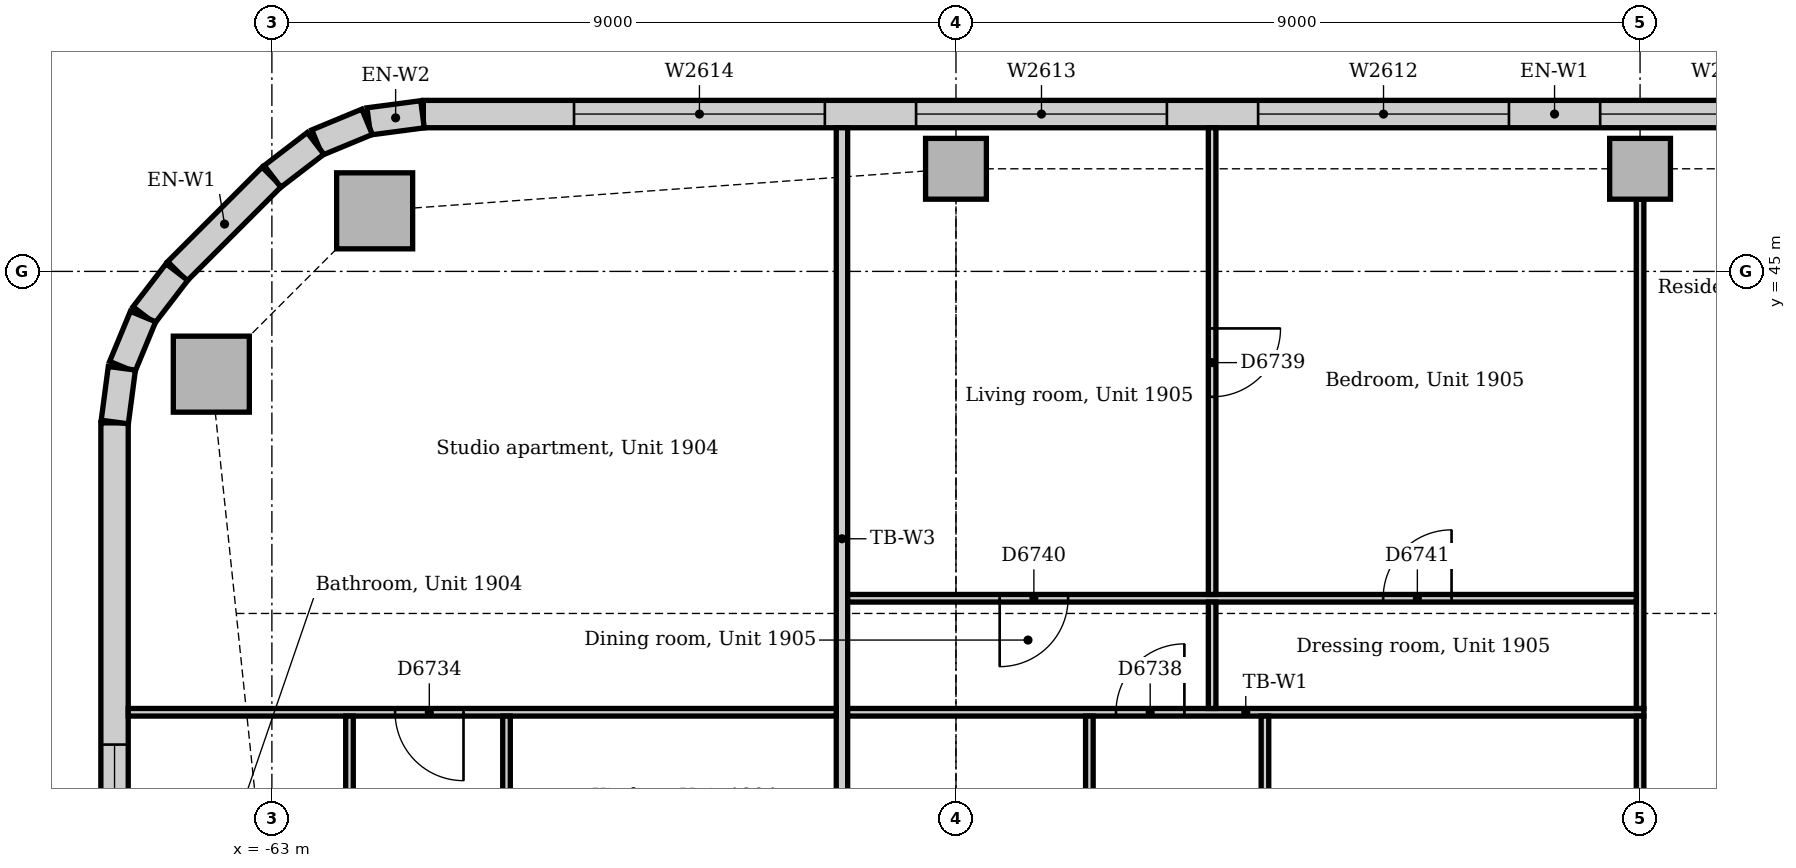
"""IFC4 building model, lengths in metres.
Left out: names, types, materials, properties, quantities, classifications, styles, units other than length and angle.
Written with IfcOpenShell. Run it as: python <this file> out.ifc"""

import sys

from ifc_helpers import new_model, si_unit, direction, frame, frame_2d, origin, origin_2d, place, context, subcontext, project, spatial, rectangle, extrude, element, fill, save


model = new_model("IFC4")
c1 = context("Model", 3, precision=1e-05, world=origin(), true_north=direction((0.0, 1.0)))
c2 = subcontext(c1, "Body", "Model", "MODEL_VIEW")
j1 = project(units=[si_unit("LENGTHUNIT", "METRE"), si_unit("PLANEANGLEUNIT", "RADIAN")], contexts=[c1])
p1 = place(None, origin())
s1 = spatial("IfcSite", under=j1, at=p1, CompositionType="ELEMENT")
p2 = place(p1, origin())
s2 = spatial("IfcBuilding", under=s1, at=p2, CompositionType="ELEMENT")
p3 = place(p2, frame((0.0, 0.0, 83.0)))
s3 = spatial("IfcBuildingStorey", under=s2, at=p3, CompositionType="ELEMENT", Elevation=83.0)
for number, where, z_axis, x_axis in (
    (1, (-61.648, 45.797, 0.0), (0.0, 0.0, 1.0), (1.0, 0.0, 0.0)),
    (2, (-63.797, 43.648, 0.0), (0.0, 0.0, 1.0), (1.0, 0.0, 0.0)),
):
    element("IfcColumn", number, at=place(p3, frame(where, z_axis=z_axis, x_axis=x_axis)), inside=s3, PredefinedType="COLUMN", context=c2, shape_type="SweptSolid", body=[
        extrude(rectangle(XDim=1.0, YDim=1.0, at=origin_2d()), origin(), (0.0, 0.0, 1.0), 3.85),
    ])
for number, where, z_axis, x_axis in (
    (3, (-54.0, 46.35, 0.0), (0.0, 0.0, 1.0), (1.0, 0.0, 0.0)),
    (4, (-45.0, 46.35, 0.0), (0.0, 0.0, 1.0), (1.0, 0.0, 0.0)),
):
    element("IfcColumn", number, at=place(p3, frame(where, z_axis=z_axis, x_axis=x_axis)), inside=s3, PredefinedType="COLUMN", context=c2, shape_type="SweptSolid", body=[
        extrude(rectangle(XDim=0.8, YDim=0.8, at=origin_2d()), origin(), (0.0, 0.0, 1.0), 3.85),
    ])
p4 = place(p3, frame((-31.243, 47.07, 0.0), z_axis=(0.0, 0.0, 1.0), x_axis=(-1.0, 0.0, 0.0)))
e5 = element("IfcWall", 5, at=p4, inside=s3, PredefinedType="STANDARD", context=c2, shape_type="SweptSolid", body=[
    extrude(rectangle(XDim=29.765, YDim=0.36, at=frame_2d((14.882, 0.0))), origin(), (0.0, 0.0, 1.0), 3.85),
])
p5 = place(p4, frame((1.982, 0.0, 0.9)))
e6 = element("IfcOpeningElement", 6, at=p5, cuts=e5, PredefinedType="OPENING", context=c2, shape_type="SweptSolid", body=[
    extrude(rectangle(XDim=3.3, YDim=1.6, at=frame_2d((1.65, 0.8))), frame((0.0, 0.19, 0.0), z_axis=(0.0, -1.0, 0.0), x_axis=(1.0, 0.0, 0.0)), (0.0, 0.0, 1.0), 0.38),
])
p6 = place(p4, frame((6.482, 0.0, 0.9)))
e7 = element("IfcOpeningElement", 7, at=p6, cuts=e5, PredefinedType="OPENING", context=c2, shape_type="SweptSolid", body=[
    extrude(rectangle(XDim=3.3, YDim=1.6, at=frame_2d((1.65, 0.8))), frame((0.0, 0.19, 0.0), z_axis=(0.0, -1.0, 0.0), x_axis=(1.0, 0.0, 0.0)), (0.0, 0.0, 1.0), 0.38),
])
p7 = place(p4, frame((10.982, 0.0, 0.9)))
e8 = element("IfcOpeningElement", 8, at=p7, cuts=e5, PredefinedType="OPENING", context=c2, shape_type="SweptSolid", body=[
    extrude(rectangle(XDim=3.3, YDim=1.6, at=frame_2d((1.65, 0.8))), frame((0.0, 0.19, 0.0), z_axis=(0.0, -1.0, 0.0), x_axis=(1.0, 0.0, 0.0)), (0.0, 0.0, 1.0), 0.38),
])
p8 = place(p4, frame((15.482, 0.0, 0.9)))
e9 = element("IfcOpeningElement", 9, at=p8, cuts=e5, PredefinedType="OPENING", context=c2, shape_type="SweptSolid", body=[
    extrude(rectangle(XDim=3.3, YDim=1.6, at=frame_2d((1.65, 0.8))), frame((0.0, 0.19, 0.0), z_axis=(0.0, -1.0, 0.0), x_axis=(1.0, 0.0, 0.0)), (0.0, 0.0, 1.0), 0.38),
])
p9 = place(p4, frame((19.982, 0.0, 0.9)))
e10 = element("IfcOpeningElement", 10, at=p9, cuts=e5, PredefinedType="OPENING", context=c2, shape_type="SweptSolid", body=[
    extrude(rectangle(XDim=3.3, YDim=1.6, at=frame_2d((1.65, 0.8))), frame((0.0, 0.19, 0.0), z_axis=(0.0, -1.0, 0.0), x_axis=(1.0, 0.0, 0.0)), (0.0, 0.0, 1.0), 0.38),
])
p10 = place(p4, frame((24.482, 0.0, 0.9)))
e11 = element("IfcOpeningElement", 11, at=p10, cuts=e5, PredefinedType="OPENING", context=c2, shape_type="SweptSolid", body=[
    extrude(rectangle(XDim=3.3, YDim=1.6, at=frame_2d((1.65, 0.8))), frame((0.0, 0.19, 0.0), z_axis=(0.0, -1.0, 0.0), x_axis=(1.0, 0.0, 0.0)), (0.0, 0.0, 1.0), 0.38),
])
p11 = place(p3, frame((-63.001, 46.244, 0.0), z_axis=(0.0, 0.0, 1.0), x_axis=(-0.707106781187, -0.707106781187, 0.0)))
e12 = element("IfcWall", 12, at=p11, inside=s3, PredefinedType="STANDARD", context=c2, shape_type="SweptSolid", body=[
    extrude(rectangle(XDim=1.757, YDim=0.36, at=frame_2d((0.879, 0.0))), origin(), (0.0, 0.0, 1.0), 3.85),
])
p12 = place(p3, frame((-65.07, 43.007, 0.0), z_axis=(0.0, 0.0, 1.0), x_axis=(0.0, -1.0, 0.0)))
e13 = element("IfcWall", 13, at=p12, inside=s3, PredefinedType="STANDARD", context=c2, shape_type="SweptSolid", body=[
    extrude(rectangle(XDim=23.765, YDim=0.36, at=frame_2d((11.882, 0.0))), origin(), (0.0, 0.0, 1.0), 3.85),
])
p13 = place(p12, frame((4.232, 0.0, 0.9)))
e14 = element("IfcOpeningElement", 14, at=p13, cuts=e13, PredefinedType="OPENING", context=c2, shape_type="SweptSolid", body=[
    extrude(rectangle(XDim=1.8, YDim=1.6, at=frame_2d((0.9, 0.8))), frame((0.0, 0.19, 0.0), z_axis=(0.0, -1.0, 0.0), x_axis=(1.0, 0.0, 0.0)), (0.0, 0.0, 1.0), 0.38),
])
p14 = place(p12, frame((9.332, 0.0, 0.9)))
e15 = element("IfcOpeningElement", 15, at=p14, cuts=e13, PredefinedType="OPENING", context=c2, shape_type="SweptSolid", body=[
    extrude(rectangle(XDim=1.8, YDim=1.6, at=frame_2d((0.9, 0.8))), frame((0.0, 0.19, 0.0), z_axis=(0.0, -1.0, 0.0), x_axis=(1.0, 0.0, 0.0)), (0.0, 0.0, 1.0), 0.38),
])
p15 = place(p12, frame((12.482, 0.0, 0.9)))
e16 = element("IfcOpeningElement", 16, at=p15, cuts=e13, PredefinedType="OPENING", context=c2, shape_type="SweptSolid", body=[
    extrude(rectangle(XDim=3.3, YDim=1.6, at=frame_2d((1.65, 0.8))), frame((0.0, 0.19, 0.0), z_axis=(0.0, -1.0, 0.0), x_axis=(1.0, 0.0, 0.0)), (0.0, 0.0, 1.0), 0.38),
])
p16 = place(p12, frame((16.982, 0.0, 0.9)))
e17 = element("IfcOpeningElement", 17, at=p16, cuts=e13, PredefinedType="OPENING", context=c2, shape_type="SweptSolid", body=[
    extrude(rectangle(XDim=3.3, YDim=1.6, at=frame_2d((1.65, 0.8))), frame((0.0, 0.19, 0.0), z_axis=(0.0, -1.0, 0.0), x_axis=(1.0, 0.0, 0.0)), (0.0, 0.0, 1.0), 0.38),
])
for number, where, z_axis, x_axis in (
    (18, (-61.019, 47.067, 0.0), (0.0, 0.0, 1.0), (-0.991, -0.131, 0.0)),
    (19, (-61.747, 46.968, 0.0), (0.0, 0.0, 1.0), (-0.924, -0.383, 0.0)),
):
    element("IfcWall", number, at=place(p3, frame(where, z_axis=z_axis, x_axis=x_axis)), inside=s3, PredefinedType="STANDARD", context=c2, shape_type="SweptSolid", body=[
        extrude(rectangle(XDim=0.713, YDim=0.36, at=frame_2d((0.356, 0.0))), origin(), (0.0, 0.0, 1.0), 3.85),
    ])
for number, where, z_axis, x_axis in (
    (20, (-62.425, 46.684, 0.0), (0.0, 0.0, 1.0), (-0.793, -0.609, 0.0)),
    (21, (-64.25, 44.991, 0.0), (0.0, 0.0, 1.0), (-0.609, -0.793, 0.0)),
):
    element("IfcWall", number, at=place(p3, frame(where, z_axis=z_axis, x_axis=x_axis)), inside=s3, PredefinedType="STANDARD", context=c2, shape_type="SweptSolid", body=[
        extrude(rectangle(XDim=0.713, YDim=0.36, at=frame_2d((0.357, 0.0))), origin(), (0.0, 0.0, 1.0), 3.85),
    ])
for number, where, z_axis, x_axis in (
    (22, (-64.695, 44.406, 0.0), (0.0, 0.0, 1.0), (-0.383, -0.924, 0.0)),
    (23, (-64.974, 43.726, 0.0), (0.0, 0.0, 1.0), (-0.131, -0.991, 0.0)),
):
    element("IfcWall", number, at=place(p3, frame(where, z_axis=z_axis, x_axis=x_axis)), inside=s3, PredefinedType="STANDARD", context=c2, shape_type="SweptSolid", body=[
        extrude(rectangle(XDim=0.713, YDim=0.36, at=frame_2d((0.356, 0.0))), origin(), (0.0, 0.0, 1.0), 3.85),
    ])
p17 = place(p3, frame((-55.5, 36.075, 0.0), z_axis=(0.0, 0.0, 1.0), x_axis=(0.0, 1.0, 0.0)))
e24 = element("IfcWall", 24, at=p17, inside=s3, PredefinedType="PARTITIONING", context=c2, shape_type="SweptSolid", body=[
    extrude(rectangle(XDim=10.815, YDim=0.15, at=frame_2d((5.407, 0.0))), origin(), (0.0, 0.0, 1.0), 3.85),
])
p18 = place(p3, frame((-55.425, 39.2, 0.0), z_axis=(0.0, 0.0, 1.0), x_axis=(1.0, 0.0, 0.0)))
e25 = element("IfcWall", 25, at=p18, inside=s3, PredefinedType="PARTITIONING", context=c2, shape_type="SweptSolid", body=[
    extrude(rectangle(XDim=10.475, YDim=0.1, at=frame_2d((5.237, 0.0))), origin(), (0.0, 0.0, 1.0), 3.85),
])
p19 = place(p18, frame((3.53, 0.0, 0.0)))
e26 = element("IfcOpeningElement", 26, at=p19, cuts=e25, PredefinedType="OPENING", context=c2, shape_type="SweptSolid", body=[
    extrude(rectangle(XDim=0.9, YDim=2.1, at=frame_2d((0.45, 1.05))), frame((0.0, 0.06, 0.0), z_axis=(0.0, -1.0, 0.0), x_axis=(1.0, 0.0, 0.0)), (0.0, 0.0, 1.0), 0.12),
])
p20 = place(p3, frame((-64.89, 39.2, 0.0), z_axis=(0.0, 0.0, 1.0), x_axis=(1.0, 0.0, 0.0)))
e27 = element("IfcWall", 27, at=p20, inside=s3, PredefinedType="PARTITIONING", context=c2, shape_type="SweptSolid", body=[
    extrude(rectangle(XDim=9.315, YDim=0.1, at=frame_2d((4.657, 0.0))), origin(), (0.0, 0.0, 1.0), 3.85),
])
p21 = place(p20, frame((3.511, 0.0, 0.0)))
e28 = element("IfcOpeningElement", 28, at=p21, cuts=e27, PredefinedType="OPENING", context=c2, shape_type="SweptSolid", body=[
    extrude(rectangle(XDim=0.9, YDim=2.1, at=frame_2d((0.45, 1.05))), frame((0.0, 0.06, 0.0), z_axis=(0.0, -1.0, 0.0), x_axis=(1.0, 0.0, 0.0)), (0.0, 0.0, 1.0), 0.12),
])
p22 = place(p3, frame((-45.0, 39.25, 0.0), z_axis=(0.0, 0.0, 1.0), x_axis=(0.0, 1.0, 0.0)))
e29 = element("IfcWall", 29, at=p22, inside=s3, PredefinedType="PARTITIONING", context=c2, shape_type="SweptSolid", body=[
    extrude(rectangle(XDim=6.7, YDim=0.1, at=frame_2d((3.35, 0.0))), origin(), (0.0, 0.0, 1.0), 3.256),
])
p23 = place(p3, frame((-45.0, 36.35, 0.0), z_axis=(0.0, 0.0, 1.0), x_axis=(0.0, 1.0, 0.0)))
e30 = element("IfcWall", 30, at=p23, inside=s3, PredefinedType="PARTITIONING", context=c2, shape_type="SweptSolid", body=[
    extrude(rectangle(XDim=2.8, YDim=0.1, at=frame_2d((1.4, 0.0))), origin(), (0.0, 0.0, 1.0), 3.256),
])
p24 = place(p3, frame((-55.425, 40.7, 0.0), z_axis=(0.0, 0.0, 1.0), x_axis=(1.0, 0.0, 0.0)))
e31 = element("IfcWall", 31, at=p24, inside=s3, PredefinedType="PARTITIONING", context=c2, shape_type="SweptSolid", body=[
    extrude(rectangle(XDim=10.375, YDim=0.1, at=frame_2d((5.188, 0.0))), origin(), (0.0, 0.0, 1.0), 3.85),
])
p25 = place(p24, frame((2.0, 0.0, 0.0)))
e32 = element("IfcOpeningElement", 32, at=p25, cuts=e31, PredefinedType="OPENING", context=c2, shape_type="SweptSolid", body=[
    extrude(rectangle(XDim=0.9, YDim=2.1, at=frame_2d((0.45, 1.05))), frame((0.0, 0.06, 0.0), z_axis=(0.0, -1.0, 0.0), x_axis=(1.0, 0.0, 0.0)), (0.0, 0.0, 1.0), 0.12),
])
p26 = place(p24, frame((7.045, 0.0, 0.0)))
e33 = element("IfcOpeningElement", 33, at=p26, cuts=e31, PredefinedType="OPENING", context=c2, shape_type="SweptSolid", body=[
    extrude(rectangle(XDim=0.9, YDim=2.1, at=frame_2d((0.45, 1.05))), frame((0.0, 0.06, 0.0), z_axis=(0.0, -1.0, 0.0), x_axis=(1.0, 0.0, 0.0)), (0.0, 0.0, 1.0), 0.12),
])
p27 = place(p3, frame((-50.63, 39.25, 0.0), z_axis=(0.0, 0.0, 1.0), x_axis=(0.0, 1.0, 0.0)))
e34 = element("IfcWall", 34, at=p27, inside=s3, PredefinedType="PARTITIONING", context=c2, shape_type="SweptSolid", body=[
    extrude(rectangle(XDim=1.4, YDim=0.1, at=frame_2d((0.7, 0.0))), origin(), (0.0, 0.0, 1.0), 3.85),
])
p28 = place(p3, frame((-50.63, 40.75, 0.0), z_axis=(0.0, 0.0, 1.0), x_axis=(0.0, 1.0, 0.0)))
e35 = element("IfcWall", 35, at=p28, inside=s3, PredefinedType="PARTITIONING", context=c2, shape_type="SweptSolid", body=[
    extrude(rectangle(XDim=6.14, YDim=0.1, at=frame_2d((3.07, 0.0))), origin(), (0.0, 0.0, 1.0), 3.85),
])
p29 = place(p28, frame((2.6, 0.0, 0.0)))
e36 = element("IfcOpeningElement", 36, at=p29, cuts=e35, PredefinedType="OPENING", context=c2, shape_type="SweptSolid", body=[
    extrude(rectangle(XDim=0.9, YDim=2.1, at=frame_2d((0.45, 1.05))), frame((0.0, 0.06, 0.0), z_axis=(0.0, -1.0, 0.0), x_axis=(1.0, 0.0, 0.0)), (0.0, 0.0, 1.0), 0.12),
])
p30 = place(p3, frame((-61.979, 36.075, 0.0), z_axis=(0.0, 0.0, 1.0), x_axis=(0.0, 1.0, 0.0)))
e37 = element("IfcWall", 37, at=p30, inside=s3, PredefinedType="PARTITIONING", context=c2, shape_type="SweptSolid", body=[
    extrude(rectangle(XDim=3.075, YDim=0.1, at=frame_2d((1.538, 0.0))), origin(), (0.0, 0.0, 1.0), 3.85),
])
p31 = place(p30, frame((1.1, 0.0, 0.0)))
e38 = element("IfcOpeningElement", 38, at=p31, cuts=e37, PredefinedType="OPENING", context=c2, shape_type="SweptSolid", body=[
    extrude(rectangle(XDim=0.9, YDim=2.1, at=frame_2d((0.45, 1.05))), frame((0.0, 0.06, 0.0), z_axis=(0.0, -1.0, 0.0), x_axis=(1.0, 0.0, 0.0)), (0.0, 0.0, 1.0), 0.12),
])
p32 = place(p3, frame((-59.913, 36.075, 0.0), z_axis=(0.0, 0.0, 1.0), x_axis=(0.0, 1.0, 0.0)))
e39 = element("IfcWall", 39, at=p32, inside=s3, PredefinedType="PARTITIONING", context=c2, shape_type="SweptSolid", body=[
    extrude(rectangle(XDim=3.075, YDim=0.1, at=frame_2d((1.538, 0.0))), origin(), (0.0, 0.0, 1.0), 3.85),
])
p33 = place(p32, frame((1.1, 0.0, 0.0)))
e40 = element("IfcOpeningElement", 40, at=p33, cuts=e39, PredefinedType="OPENING", context=c2, shape_type="SweptSolid", body=[
    extrude(rectangle(XDim=0.9, YDim=2.1, at=frame_2d((0.45, 1.05))), frame((0.0, 0.06, 0.0), z_axis=(0.0, -1.0, 0.0), x_axis=(1.0, 0.0, 0.0)), (0.0, 0.0, 1.0), 0.12),
])
p34 = place(p3, frame((-52.245, 36.075, 0.0), z_axis=(0.0, 0.0, 1.0), x_axis=(0.0, 1.0, 0.0)))
e41 = element("IfcWall", 41, at=p34, inside=s3, PredefinedType="PARTITIONING", context=c2, shape_type="SweptSolid", body=[
    extrude(rectangle(XDim=3.075, YDim=0.1, at=frame_2d((1.538, 0.0))), origin(), (0.0, 0.0, 1.0), 3.85),
])
p35 = place(p34, frame((1.1, 0.0, 0.0)))
e42 = element("IfcOpeningElement", 42, at=p35, cuts=e41, PredefinedType="OPENING", context=c2, shape_type="SweptSolid", body=[
    extrude(rectangle(XDim=0.9, YDim=2.1, at=frame_2d((0.45, 1.05))), frame((0.0, 0.06, 0.0), z_axis=(0.0, -1.0, 0.0), x_axis=(1.0, 0.0, 0.0)), (0.0, 0.0, 1.0), 0.12),
])
p36 = place(p3, frame((-49.935, 36.075, 0.0), z_axis=(0.0, 0.0, 1.0), x_axis=(0.0, 1.0, 0.0)))
e43 = element("IfcWall", 43, at=p36, inside=s3, PredefinedType="PARTITIONING", context=c2, shape_type="SweptSolid", body=[
    extrude(rectangle(XDim=3.075, YDim=0.1, at=frame_2d((1.538, 0.0))), origin(), (0.0, 0.0, 1.0), 3.85),
])
p37 = place(p36, frame((1.1, 0.0, 0.0)))
e44 = element("IfcOpeningElement", 44, at=p37, cuts=e43, PredefinedType="OPENING", context=c2, shape_type="SweptSolid", body=[
    extrude(rectangle(XDim=0.9, YDim=2.1, at=frame_2d((0.45, 1.05))), frame((0.0, 0.06, 0.0), z_axis=(0.0, -1.0, 0.0), x_axis=(1.0, 0.0, 0.0)), (0.0, 0.0, 1.0), 0.12),
])
p38 = place(p7, origin())
e45 = element("IfcWindow", 45, at=p38, inside=s3, PartitioningType="SINGLE_PANEL", PredefinedType="WINDOW", context=c2, shape_type="SweptSolid", body=[
    extrude(rectangle(XDim=3.3, YDim=1.6, at=frame_2d((1.65, 0.8))), frame((0.0, 0.13, 0.0), z_axis=(0.0, -1.0, 0.0), x_axis=(1.0, 0.0, 0.0)), (0.0, 0.0, 1.0), 0.06),
])
fill(e8, e45)
p39 = place(p8, origin())
e46 = element("IfcWindow", 46, at=p39, inside=s3, PartitioningType="SINGLE_PANEL", PredefinedType="WINDOW", context=c2, shape_type="SweptSolid", body=[
    extrude(rectangle(XDim=3.3, YDim=1.6, at=frame_2d((1.65, 0.8))), frame((0.0, 0.13, 0.0), z_axis=(0.0, -1.0, 0.0), x_axis=(1.0, 0.0, 0.0)), (0.0, 0.0, 1.0), 0.06),
])
fill(e9, e46)
p40 = place(p9, origin())
e47 = element("IfcWindow", 47, at=p40, inside=s3, PartitioningType="SINGLE_PANEL", PredefinedType="WINDOW", context=c2, shape_type="SweptSolid", body=[
    extrude(rectangle(XDim=3.3, YDim=1.6, at=frame_2d((1.65, 0.8))), frame((0.0, 0.13, 0.0), z_axis=(0.0, -1.0, 0.0), x_axis=(1.0, 0.0, 0.0)), (0.0, 0.0, 1.0), 0.06),
])
fill(e10, e47)
p41 = place(p10, origin())
e48 = element("IfcWindow", 48, at=p41, inside=s3, PartitioningType="SINGLE_PANEL", PredefinedType="WINDOW", context=c2, shape_type="SweptSolid", body=[
    extrude(rectangle(XDim=3.3, YDim=1.6, at=frame_2d((1.65, 0.8))), frame((0.0, 0.13, 0.0), z_axis=(0.0, -1.0, 0.0), x_axis=(1.0, 0.0, 0.0)), (0.0, 0.0, 1.0), 0.06),
])
fill(e11, e48)
p42 = place(p13, origin())
e49 = element("IfcWindow", 49, at=p42, inside=s3, PartitioningType="SINGLE_PANEL", PredefinedType="WINDOW", context=c2, shape_type="SweptSolid", body=[
    extrude(rectangle(XDim=1.8, YDim=1.6, at=frame_2d((0.9, 0.8))), frame((0.0, 0.13, 0.0), z_axis=(0.0, -1.0, 0.0), x_axis=(1.0, 0.0, 0.0)), (0.0, 0.0, 1.0), 0.06),
])
fill(e14, e49)
p43 = place(p21, frame((0.9, 0.0, 0.0), z_axis=(0.0, 0.0, 1.0), x_axis=(-1.0, 0.0, 0.0)))
e50 = element("IfcDoor", 50, at=p43, inside=s3, OperationType="SINGLE_SWING_LEFT", PredefinedType="DOOR", context=c2, shape_type="SweptSolid", body=[
    extrude(rectangle(XDim=0.9, YDim=2.1, at=frame_2d((0.45, 1.05))), frame((0.0, 0.025, 0.0), z_axis=(0.0, -1.0, 0.0), x_axis=(1.0, 0.0, 0.0)), (0.0, 0.0, 1.0), 0.05),
])
fill(e28, e50)
p44 = place(p19, origin())
e51 = element("IfcDoor", 51, at=p44, inside=s3, OperationType="SINGLE_SWING_RIGHT", PredefinedType="DOOR", context=c2, shape_type="SweptSolid", body=[
    extrude(rectangle(XDim=0.9, YDim=2.1, at=frame_2d((0.45, 1.05))), frame((0.0, 0.025, 0.0), z_axis=(0.0, -1.0, 0.0), x_axis=(1.0, 0.0, 0.0)), (0.0, 0.0, 1.0), 0.05),
])
fill(e26, e51)
p45 = place(p29, frame((0.9, 0.0, 0.0), z_axis=(0.0, 0.0, 1.0), x_axis=(-1.0, 0.0, 0.0)))
e52 = element("IfcDoor", 52, at=p45, inside=s3, OperationType="SINGLE_SWING_LEFT", PredefinedType="DOOR", context=c2, shape_type="SweptSolid", body=[
    extrude(rectangle(XDim=0.9, YDim=2.1, at=frame_2d((0.45, 1.05))), frame((0.0, 0.025, 0.0), z_axis=(0.0, -1.0, 0.0), x_axis=(1.0, 0.0, 0.0)), (0.0, 0.0, 1.0), 0.05),
])
fill(e36, e52)
p46 = place(p25, frame((0.9, 0.0, 0.0), z_axis=(0.0, 0.0, 1.0), x_axis=(-1.0, 0.0, 0.0)))
e53 = element("IfcDoor", 53, at=p46, inside=s3, OperationType="SINGLE_SWING_RIGHT", PredefinedType="DOOR", context=c2, shape_type="SweptSolid", body=[
    extrude(rectangle(XDim=0.9, YDim=2.1, at=frame_2d((0.45, 1.05))), frame((0.0, 0.025, 0.0), z_axis=(0.0, -1.0, 0.0), x_axis=(1.0, 0.0, 0.0)), (0.0, 0.0, 1.0), 0.05),
])
fill(e32, e53)
p47 = place(p26, origin())
e54 = element("IfcDoor", 54, at=p47, inside=s3, OperationType="SINGLE_SWING_RIGHT", PredefinedType="DOOR", context=c2, shape_type="SweptSolid", body=[
    extrude(rectangle(XDim=0.9, YDim=2.1, at=frame_2d((0.45, 1.05))), frame((0.0, 0.025, 0.0), z_axis=(0.0, -1.0, 0.0), x_axis=(1.0, 0.0, 0.0)), (0.0, 0.0, 1.0), 0.05),
])
fill(e33, e54)
save(model, sys.argv[1])
